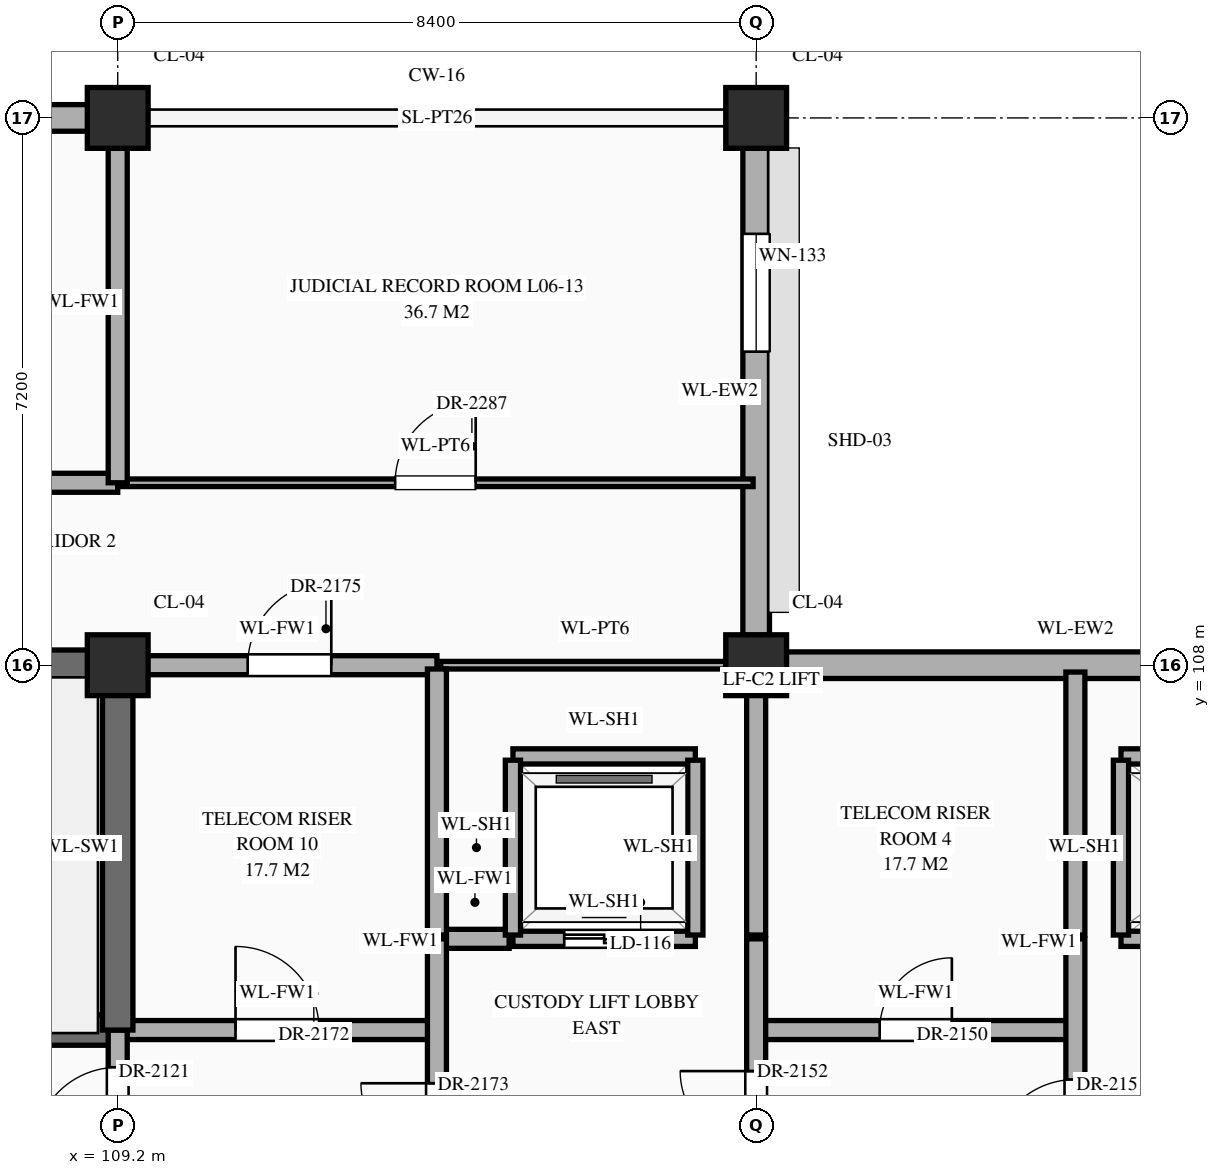
"""IFC4 building model, lengths in metres.
Left out: names, types, materials, properties, quantities, classifications, styles, units other than length and angle.
Written with IfcOpenShell. Run it as: python <this file> out.ifc"""

import sys

from ifc_helpers import new_model, si_unit, direction, frame, frame_2d, origin, origin_2d, place, context, subcontext, project, spatial, rectangle, extrude, element, fill, save


model = new_model("IFC4")
c1 = context("Model", 3, precision=1e-05, world=origin(), true_north=direction((0.0, 1.0)))
c2 = subcontext(c1, "Body", "Model", "MODEL_VIEW")
j1 = project(units=[si_unit("LENGTHUNIT", "METRE"), si_unit("PLANEANGLEUNIT", "RADIAN")], contexts=[c1])
p1 = place(None, origin())
s1 = spatial("IfcSite", under=j1, at=p1, CompositionType="ELEMENT")
p2 = place(p1, origin())
s2 = spatial("IfcBuilding", under=s1, at=p2, CompositionType="ELEMENT")
p3 = place(p2, frame((0.0, 0.0, 26.1)))
s3 = spatial("IfcBuildingStorey", under=s2, at=p3, CompositionType="ELEMENT", Elevation=26.1)
for number, where, z_axis, x_axis in (
    (1, (109.2, 108.0, 0.0), (0.0, 0.0, 1.0), (1.0, 0.0, 0.0)),
    (2, (109.2, 115.2, 0.0), (0.0, 0.0, 1.0), (1.0, 0.0, 0.0)),
    (3, (117.6, 108.0, 0.0), (0.0, 0.0, 1.0), (1.0, 0.0, 0.0)),
    (4, (117.6, 115.2, 0.0), (0.0, 0.0, 1.0), (1.0, 0.0, 0.0)),
):
    element("IfcColumn", number, at=place(p3, frame(where, z_axis=z_axis, x_axis=x_axis)), inside=s3, PredefinedType="COLUMN", context=c2, shape_type="SweptSolid", body=[
        extrude(rectangle(XDim=0.8, YDim=0.8, at=origin_2d()), origin(), (0.0, 0.0, 1.0), 4.5),
    ])
p4 = place(p3, frame((101.195, 115.2, 0.0), z_axis=(0.0, 0.0, 1.0), x_axis=(1.0, 0.0, 0.0)))
e5 = element("IfcWall", 5, at=p4, inside=s3, PredefinedType="STANDARD", context=c2, shape_type="SweptSolid", body=[
    extrude(rectangle(XDim=7.61, YDim=0.35, at=frame_2d((3.805, 0.0))), origin(), (0.0, 0.0, 1.0), 3.59),
])
p5 = place(p3, frame((117.6, 108.395, 0.0), z_axis=(0.0, 0.0, 1.0), x_axis=(0.0, 1.0, 0.0)))
e6 = element("IfcWall", 6, at=p5, inside=s3, PredefinedType="STANDARD", context=c2, shape_type="SweptSolid", body=[
    extrude(rectangle(XDim=6.41, YDim=0.35, at=frame_2d((3.205, 0.0))), origin(), (0.0, 0.0, 1.0), 3.59),
])
p6 = place(p5, frame((3.73, 0.0, 0.85)))
e7 = element("IfcOpeningElement", 7, at=p6, cuts=e6, PredefinedType="OPENING", context=c2, shape_type="SweptSolid", body=[
    extrude(rectangle(XDim=1.55, YDim=2.12, at=frame_2d((0.775, 1.06))), frame((0.0, 0.187, 0.0), z_axis=(0.0, -1.0, 0.0), x_axis=(1.0, 0.0, 0.0)), (0.0, 0.0, 1.0), 0.374),
])
p7 = place(p3, frame((117.995, 108.0, 0.0), z_axis=(0.0, 0.0, 1.0), x_axis=(1.0, 0.0, 0.0)))
e8 = element("IfcWall", 8, at=p7, inside=s3, PredefinedType="STANDARD", context=c2, shape_type="SweptSolid", body=[
    extrude(rectangle(XDim=7.61, YDim=0.35, at=frame_2d((3.805, 0.0))), origin(), (0.0, 0.0, 1.0), 3.59),
])
p8 = place(p3, frame((100.8, 103.2, 0.0), z_axis=(0.0, 0.0, 1.0), x_axis=(1.0, 0.0, 0.0)))
e9 = element("IfcWall", 9, at=p8, inside=s3, PredefinedType="SHEAR", context=c2, shape_type="SweptSolid", body=[
    extrude(rectangle(XDim=8.4, YDim=0.4, at=frame_2d((4.2, 0.0))), origin(), (0.0, 0.0, 1.0), 4.24),
])
p9 = place(p8, frame((0.65, 0.0, 0.0)))
e10 = element("IfcOpeningElement", 10, at=p9, cuts=e9, PredefinedType="OPENING", context=c2, shape_type="SweptSolid", body=[
    extrude(rectangle(XDim=1.1, YDim=2.2, at=frame_2d((0.55, 1.1))), frame((0.0, 0.212, 0.0), z_axis=(0.0, -1.0, 0.0), x_axis=(1.0, 0.0, 0.0)), (0.0, 0.0, 1.0), 0.424),
])
p10 = place(p3, frame((109.2, 103.2, 0.0), z_axis=(0.0, 0.0, 1.0), x_axis=(1.0, 0.0, 0.0)))
e11 = element("IfcWall", 11, at=p10, inside=s3, PredefinedType="STANDARD", context=c2, shape_type="SweptSolid", body=[
    extrude(rectangle(XDim=4.2, YDim=0.25, at=frame_2d((2.1, 0.0))), origin(), (0.0, 0.0, 1.0), 4.24),
])
p11 = place(p10, frame((1.55, 0.0, 0.0)))
e12 = element("IfcOpeningElement", 12, at=p11, cuts=e11, PredefinedType="OPENING", context=c2, shape_type="SweptSolid", body=[
    extrude(rectangle(XDim=1.1, YDim=2.2, at=frame_2d((0.55, 1.1))), frame((0.0, 0.137, 0.0), z_axis=(0.0, -1.0, 0.0), x_axis=(1.0, 0.0, 0.0)), (0.0, 0.0, 1.0), 0.274),
])
p12 = place(p3, frame((117.6, 103.2, 0.0), z_axis=(0.0, 0.0, 1.0), x_axis=(1.0, 0.0, 0.0)))
e13 = element("IfcWall", 13, at=p12, inside=s3, PredefinedType="STANDARD", context=c2, shape_type="SweptSolid", body=[
    extrude(rectangle(XDim=4.2, YDim=0.25, at=frame_2d((2.1, 0.0))), origin(), (0.0, 0.0, 1.0), 4.24),
])
p13 = place(p12, frame((1.625, 0.0, 0.0)))
e14 = element("IfcOpeningElement", 14, at=p13, cuts=e13, PredefinedType="OPENING", context=c2, shape_type="SweptSolid", body=[
    extrude(rectangle(XDim=0.95, YDim=2.15, at=frame_2d((0.475, 1.075))), frame((0.0, 0.137, 0.0), z_axis=(0.0, -1.0, 0.0), x_axis=(1.0, 0.0, 0.0)), (0.0, 0.0, 1.0), 0.274),
])
p14 = place(p3, frame((113.45, 104.4, 0.0), z_axis=(0.0, 0.0, 1.0), x_axis=(1.0, 0.0, 0.0)))
e15 = element("IfcWall", 15, at=p14, inside=s3, PredefinedType="STANDARD", context=c2, shape_type="SweptSolid", body=[
    extrude(rectangle(XDim=0.9, YDim=0.25, at=frame_2d((0.45, 0.0))), origin(), (0.0, 0.0, 1.0), 4.24),
])
p15 = place(p3, frame((114.4, 104.4, 0.0), z_axis=(0.0, 0.0, 1.0), x_axis=(1.0, 0.0, 0.0)))
e16 = element("IfcWall", 16, at=p15, inside=s3, PredefinedType="STANDARD", context=c2, shape_type="SweptSolid", body=[
    extrude(rectangle(XDim=2.4, YDim=0.2, at=frame_2d((1.2, 0.0))), origin(), (0.0, 0.0, 1.0), 4.24),
])
p16 = place(p15, frame((0.675, 0.0, 0.0)))
e17 = element("IfcOpeningElement", 17, at=p16, cuts=e16, PredefinedType="OPENING", context=c2, shape_type="SweptSolid", body=[
    extrude(rectangle(XDim=1.05, YDim=2.15, at=frame_2d((0.525, 1.075))), frame((0.0, 0.112, 0.0), z_axis=(0.0, -1.0, 0.0), x_axis=(1.0, 0.0, 0.0)), (0.0, 0.0, 1.0), 0.224),
])
p17 = place(p3, frame((122.4, 104.4, 0.0), z_axis=(0.0, 0.0, 1.0), x_axis=(1.0, 0.0, 0.0)))
e18 = element("IfcWall", 18, at=p17, inside=s3, PredefinedType="STANDARD", context=c2, shape_type="SweptSolid", body=[
    extrude(rectangle(XDim=3.0, YDim=0.2, at=frame_2d((1.5, 0.0))), origin(), (0.0, 0.0, 1.0), 4.24),
])
p18 = place(p17, frame((0.9, 0.0, 0.0)))
e19 = element("IfcOpeningElement", 19, at=p18, cuts=e18, PredefinedType="OPENING", context=c2, shape_type="SweptSolid", body=[
    extrude(rectangle(XDim=1.2, YDim=2.15, at=frame_2d((0.6, 1.075))), frame((0.0, 0.112, 0.0), z_axis=(0.0, -1.0, 0.0), x_axis=(1.0, 0.0, 0.0)), (0.0, 0.0, 1.0), 0.224),
])
p19 = place(p3, frame((114.4, 106.8, 0.0), z_axis=(0.0, 0.0, 1.0), x_axis=(1.0, 0.0, 0.0)))
e20 = element("IfcWall", 20, at=p19, inside=s3, PredefinedType="STANDARD", context=c2, shape_type="SweptSolid", body=[
    extrude(rectangle(XDim=2.4, YDim=0.2, at=frame_2d((1.2, 0.0))), origin(), (0.0, 0.0, 1.0), 4.24),
])
p20 = place(p3, frame((122.4, 106.8, 0.0), z_axis=(0.0, 0.0, 1.0), x_axis=(1.0, 0.0, 0.0)))
e21 = element("IfcWall", 21, at=p20, inside=s3, PredefinedType="STANDARD", context=c2, shape_type="SweptSolid", body=[
    extrude(rectangle(XDim=3.0, YDim=0.2, at=frame_2d((1.5, 0.0))), origin(), (0.0, 0.0, 1.0), 4.24),
])
p21 = place(p3, frame((100.8, 108.0, 0.0), z_axis=(0.0, 0.0, 1.0), x_axis=(1.0, 0.0, 0.0)))
e22 = element("IfcWall", 22, at=p21, inside=s3, PredefinedType="SHEAR", context=c2, shape_type="SweptSolid", body=[
    extrude(rectangle(XDim=8.4, YDim=0.4, at=frame_2d((4.2, 0.0))), origin(), (0.0, 0.0, 1.0), 4.24),
])
p22 = place(p3, frame((109.2, 108.0, 0.0), z_axis=(0.0, 0.0, 1.0), x_axis=(1.0, 0.0, 0.0)))
e23 = element("IfcWall", 23, at=p22, inside=s3, PredefinedType="STANDARD", context=c2, shape_type="SweptSolid", body=[
    extrude(rectangle(XDim=4.2, YDim=0.25, at=frame_2d((2.1, 0.0))), origin(), (0.0, 0.0, 1.0), 3.39),
])
p23 = place(p22, frame((1.71, 0.0, 0.0)))
e24 = element("IfcOpeningElement", 24, at=p23, cuts=e23, PredefinedType="OPENING", context=c2, shape_type="SweptSolid", body=[
    extrude(rectangle(XDim=1.1, YDim=2.2, at=frame_2d((0.55, 1.1))), frame((0.0, 0.137, 0.0), z_axis=(0.0, -1.0, 0.0), x_axis=(1.0, 0.0, 0.0)), (0.0, 0.0, 1.0), 0.274),
])
p24 = place(p3, frame((113.45, 108.0, 0.0), z_axis=(0.0, 0.0, 1.0), x_axis=(1.0, 0.0, 0.0)))
e25 = element("IfcWall", 25, at=p24, inside=s3, PredefinedType="STANDARD", context=c2, shape_type="SweptSolid", body=[
    extrude(rectangle(XDim=4.06, YDim=0.1, at=frame_2d((2.03, 0.0))), origin(), (0.0, 0.0, 1.0), 3.39),
])
p25 = place(p3, frame((100.8, 110.4, 0.0), z_axis=(0.0, 0.0, 1.0), x_axis=(1.0, 0.0, 0.0)))
e26 = element("IfcWall", 26, at=p25, inside=s3, PredefinedType="STANDARD", context=c2, shape_type="SweptSolid", body=[
    extrude(rectangle(XDim=8.4, YDim=0.25, at=frame_2d((4.2, 0.0))), origin(), (0.0, 0.0, 1.0), 4.24),
])
p26 = place(p25, frame((3.65, 0.0, 0.0)))
e27 = element("IfcOpeningElement", 27, at=p26, cuts=e26, PredefinedType="OPENING", context=c2, shape_type="SweptSolid", body=[
    extrude(rectangle(XDim=1.1, YDim=2.2, at=frame_2d((0.55, 1.1))), frame((0.0, 0.137, 0.0), z_axis=(0.0, -1.0, 0.0), x_axis=(1.0, 0.0, 0.0)), (0.0, 0.0, 1.0), 0.274),
])
p27 = place(p3, frame((109.2, 110.4, 0.0), z_axis=(0.0, 0.0, 1.0), x_axis=(1.0, 0.0, 0.0)))
e28 = element("IfcWall", 28, at=p27, inside=s3, PredefinedType="STANDARD", context=c2, shape_type="SweptSolid", body=[
    extrude(rectangle(XDim=8.36, YDim=0.1, at=frame_2d((4.18, 0.0))), origin(), (0.0, 0.0, 1.0), 4.24),
])
p28 = place(p27, frame((3.65, 0.0, 0.0)))
e29 = element("IfcOpeningElement", 29, at=p28, cuts=e28, PredefinedType="OPENING", context=c2, shape_type="SweptSolid", body=[
    extrude(rectangle(XDim=1.06, YDim=2.4, at=frame_2d((0.53, 1.2))), frame((0.0, 0.062, 0.0), z_axis=(0.0, -1.0, 0.0), x_axis=(1.0, 0.0, 0.0)), (0.0, 0.0, 1.0), 0.124),
])
p29 = place(p3, frame((109.2, 100.8, 0.0), z_axis=(0.0, 0.0, 1.0), x_axis=(0.0, 1.0, 0.0)))
e30 = element("IfcWall", 30, at=p29, inside=s3, PredefinedType="STANDARD", context=c2, shape_type="SweptSolid", body=[
    extrude(rectangle(XDim=2.4, YDim=0.25, at=frame_2d((1.2, 0.0))), origin(), (0.0, 0.0, 1.0), 3.49),
])
p30 = place(p29, frame((0.81, 0.0, 0.0)))
e31 = element("IfcOpeningElement", 31, at=p30, cuts=e30, PredefinedType="OPENING", context=c2, shape_type="SweptSolid", body=[
    extrude(rectangle(XDim=1.1, YDim=2.2, at=frame_2d((0.55, 1.1))), frame((0.0, 0.137, 0.0), z_axis=(0.0, -1.0, 0.0), x_axis=(1.0, 0.0, 0.0)), (0.0, 0.0, 1.0), 0.274),
])
p31 = place(p3, frame((109.2, 103.2, 0.0), z_axis=(0.0, 0.0, 1.0), x_axis=(0.0, 1.0, 0.0)))
e32 = element("IfcWall", 32, at=p31, inside=s3, PredefinedType="SHEAR", context=c2, shape_type="SweptSolid", body=[
    extrude(rectangle(XDim=4.8, YDim=0.4, at=frame_2d((2.4, 0.0))), origin(), (0.0, 0.0, 1.0), 4.24),
])
p32 = place(p3, frame((109.2, 110.4, 0.0), z_axis=(0.0, 0.0, 1.0), x_axis=(0.0, 1.0, 0.0)))
e33 = element("IfcWall", 33, at=p32, inside=s3, PredefinedType="STANDARD", context=c2, shape_type="SweptSolid", body=[
    extrude(rectangle(XDim=4.76, YDim=0.25, at=frame_2d((2.38, 0.0))), origin(), (0.0, 0.0, 1.0), 3.49),
])
p33 = place(p3, frame((113.4, 100.8, 0.0), z_axis=(0.0, 0.0, 1.0), x_axis=(0.0, 1.0, 0.0)))
e34 = element("IfcWall", 34, at=p33, inside=s3, PredefinedType="STANDARD", context=c2, shape_type="SweptSolid", body=[
    extrude(rectangle(XDim=3.6, YDim=0.25, at=frame_2d((1.8, 0.0))), origin(), (0.0, 0.0, 1.0), 3.84),
])
p34 = place(p33, frame((0.7, 0.0, 0.0)))
e35 = element("IfcOpeningElement", 35, at=p34, cuts=e34, PredefinedType="OPENING", context=c2, shape_type="SweptSolid", body=[
    extrude(rectangle(XDim=1.0, YDim=2.2, at=frame_2d((0.5, 1.1))), frame((0.0, 0.137, 0.0), z_axis=(0.0, -1.0, 0.0), x_axis=(1.0, 0.0, 0.0)), (0.0, 0.0, 1.0), 0.274),
])
p35 = place(p3, frame((113.4, 104.45, 0.0), z_axis=(0.0, 0.0, 1.0), x_axis=(0.0, 1.0, 0.0)))
e36 = element("IfcWall", 36, at=p35, inside=s3, PredefinedType="STANDARD", context=c2, shape_type="SweptSolid", body=[
    extrude(rectangle(XDim=3.5, YDim=0.25, at=frame_2d((1.75, 0.0))), origin(), (0.0, 0.0, 1.0), 3.84),
])
for number, where, z_axis, x_axis in (
    (37, (114.4, 104.45, 0.0), (0.0, 0.0, 1.0), (0.0, 1.0, 0.0)),
    (38, (116.8, 104.45, 0.0), (0.0, 0.0, 1.0), (0.0, 1.0, 0.0)),
):
    element("IfcWall", number, at=place(p3, frame(where, z_axis=z_axis, x_axis=x_axis)), inside=s3, PredefinedType="STANDARD", context=c2, shape_type="SweptSolid", body=[
        extrude(rectangle(XDim=2.3, YDim=0.2, at=frame_2d((1.15, 0.0))), origin(), (0.0, 0.0, 1.0), 4.24),
    ])
p36 = place(p3, frame((117.6, 91.2, 0.0), z_axis=(0.0, 0.0, 1.0), x_axis=(0.0, 1.0, 0.0)))
e39 = element("IfcWall", 39, at=p36, inside=s3, PredefinedType="STANDARD", context=c2, shape_type="SweptSolid", body=[
    extrude(rectangle(XDim=13.2, YDim=0.25, at=frame_2d((6.6, 0.0))), origin(), (0.0, 0.0, 1.0), 3.49),
])
p37 = place(p36, frame((0.49, 0.0, 0.0)))
e40 = element("IfcOpeningElement", 40, at=p37, cuts=e39, PredefinedType="OPENING", context=c2, shape_type="SweptSolid", body=[
    extrude(rectangle(XDim=1.1, YDim=2.2, at=frame_2d((0.55, 1.1))), frame((0.0, 0.137, 0.0), z_axis=(0.0, -1.0, 0.0), x_axis=(1.0, 0.0, 0.0)), (0.0, 0.0, 1.0), 0.274),
])
p38 = place(p36, frame((10.46, 0.0, 0.0)))
e41 = element("IfcOpeningElement", 41, at=p38, cuts=e39, PredefinedType="OPENING", context=c2, shape_type="SweptSolid", body=[
    extrude(rectangle(XDim=1.0, YDim=2.2, at=frame_2d((0.5, 1.1))), frame((0.0, 0.137, 0.0), z_axis=(0.0, -1.0, 0.0), x_axis=(1.0, 0.0, 0.0)), (0.0, 0.0, 1.0), 0.274),
])
p39 = place(p36, frame((3.26, 0.0, 0.0)))
e42 = element("IfcOpeningElement", 42, at=p39, cuts=e39, PredefinedType="OPENING", context=c2, shape_type="SweptSolid", body=[
    extrude(rectangle(XDim=1.0, YDim=2.2, at=frame_2d((0.5, 1.1))), frame((0.0, 0.137, 0.0), z_axis=(0.0, -1.0, 0.0), x_axis=(1.0, 0.0, 0.0)), (0.0, 0.0, 1.0), 0.274),
])
p40 = place(p3, frame((117.6, 104.45, 0.0), z_axis=(0.0, 0.0, 1.0), x_axis=(0.0, 1.0, 0.0)))
e43 = element("IfcWall", 43, at=p40, inside=s3, PredefinedType="STANDARD", context=c2, shape_type="SweptSolid", body=[
    extrude(rectangle(XDim=3.46, YDim=0.25, at=frame_2d((1.73, 0.0))), origin(), (0.0, 0.0, 1.0), 3.49),
])
p41 = place(p3, frame((121.8, 100.8, 0.0), z_axis=(0.0, 0.0, 1.0), x_axis=(0.0, 1.0, 0.0)))
e44 = element("IfcWall", 44, at=p41, inside=s3, PredefinedType="STANDARD", context=c2, shape_type="SweptSolid", body=[
    extrude(rectangle(XDim=3.6, YDim=0.25, at=frame_2d((1.8, 0.0))), origin(), (0.0, 0.0, 1.0), 3.89),
])
p42 = place(p41, frame((0.65, 0.0, 0.0)))
e45 = element("IfcOpeningElement", 45, at=p42, cuts=e44, PredefinedType="OPENING", context=c2, shape_type="SweptSolid", body=[
    extrude(rectangle(XDim=1.1, YDim=2.2, at=frame_2d((0.55, 1.1))), frame((0.0, 0.137, 0.0), z_axis=(0.0, -1.0, 0.0), x_axis=(1.0, 0.0, 0.0)), (0.0, 0.0, 1.0), 0.274),
])
p43 = place(p3, frame((121.8, 104.45, 0.0), z_axis=(0.0, 0.0, 1.0), x_axis=(0.0, 1.0, 0.0)))
e46 = element("IfcWall", 46, at=p43, inside=s3, PredefinedType="STANDARD", context=c2, shape_type="SweptSolid", body=[
    extrude(rectangle(XDim=3.46, YDim=0.25, at=frame_2d((1.73, 0.0))), origin(), (0.0, 0.0, 1.0), 3.89),
])
p44 = place(p3, frame((122.4, 104.45, 0.0), z_axis=(0.0, 0.0, 1.0), x_axis=(0.0, 1.0, 0.0)))
e47 = element("IfcWall", 47, at=p44, inside=s3, PredefinedType="STANDARD", context=c2, shape_type="SweptSolid", body=[
    extrude(rectangle(XDim=2.3, YDim=0.2, at=frame_2d((1.15, 0.0))), origin(), (0.0, 0.0, 1.0), 4.24),
])
p45 = place(p6, origin())
e48 = element("IfcWindow", 48, at=p45, inside=s3, PartitioningType="SINGLE_PANEL", PredefinedType="WINDOW", context=c2, shape_type="SweptSolid", body=[
    extrude(rectangle(XDim=1.55, YDim=2.12, at=frame_2d((0.775, 1.06))), frame((0.0, 0.03, 0.0), z_axis=(0.0, -1.0, 0.0), x_axis=(1.0, 0.0, 0.0)), (0.0, 0.0, 1.0), 0.06),
])
fill(e7, e48)
p46 = place(p16, origin())
e49 = element("IfcDoor", 49, at=p46, inside=s3, OperationType="DOUBLE_DOOR_SLIDING", PredefinedType="DOOR", context=c2, shape_type="SweptSolid", body=[
    extrude(rectangle(XDim=1.05, YDim=2.15, at=frame_2d((0.525, 1.075))), frame((0.0, 0.025, 0.0), z_axis=(0.0, -1.0, 0.0), x_axis=(1.0, 0.0, 0.0)), (0.0, 0.0, 1.0), 0.05),
])
fill(e17, e49)
p47 = place(p30, origin())
e50 = element("IfcDoor", 50, at=p47, inside=s3, OperationType="SINGLE_SWING_LEFT", PredefinedType="DOOR", context=c2, shape_type="SweptSolid", body=[
    extrude(rectangle(XDim=1.1, YDim=2.2, at=frame_2d((0.55, 1.1))), frame((0.0, 0.025, 0.0), z_axis=(0.0, -1.0, 0.0), x_axis=(1.0, 0.0, 0.0)), (0.0, 0.0, 1.0), 0.05),
])
fill(e31, e50)
p48 = place(p13, origin())
e51 = element("IfcDoor", 51, at=p48, inside=s3, OperationType="SINGLE_SWING_RIGHT", PredefinedType="DOOR", context=c2, shape_type="SweptSolid", body=[
    extrude(rectangle(XDim=0.95, YDim=2.15, at=frame_2d((0.475, 1.075))), frame((0.0, 0.025, 0.0), z_axis=(0.0, -1.0, 0.0), x_axis=(1.0, 0.0, 0.0)), (0.0, 0.0, 1.0), 0.05),
])
fill(e14, e51)
p49 = place(p42, origin())
e52 = element("IfcDoor", 52, at=p49, inside=s3, OperationType="SINGLE_SWING_LEFT", PredefinedType="DOOR", context=c2, shape_type="SweptSolid", body=[
    extrude(rectangle(XDim=1.1, YDim=2.2, at=frame_2d((0.55, 1.1))), frame((0.0, 0.025, 0.0), z_axis=(0.0, -1.0, 0.0), x_axis=(1.0, 0.0, 0.0)), (0.0, 0.0, 1.0), 0.05),
])
fill(e45, e52)
p50 = place(p38, origin())
e53 = element("IfcDoor", 53, at=p50, inside=s3, OperationType="SINGLE_SWING_RIGHT", PredefinedType="DOOR", context=c2, shape_type="SweptSolid", body=[
    extrude(rectangle(XDim=1.0, YDim=2.2, at=frame_2d((0.5, 1.1))), frame((0.0, 0.025, 0.0), z_axis=(0.0, -1.0, 0.0), x_axis=(1.0, 0.0, 0.0)), (0.0, 0.0, 1.0), 0.05),
])
fill(e41, e53)
p51 = place(p11, origin())
e54 = element("IfcDoor", 54, at=p51, inside=s3, OperationType="SINGLE_SWING_LEFT", PredefinedType="DOOR", context=c2, shape_type="SweptSolid", body=[
    extrude(rectangle(XDim=1.1, YDim=2.2, at=frame_2d((0.55, 1.1))), frame((0.0, 0.025, 0.0), z_axis=(0.0, -1.0, 0.0), x_axis=(1.0, 0.0, 0.0)), (0.0, 0.0, 1.0), 0.05),
])
fill(e12, e54)
p52 = place(p34, origin())
e55 = element("IfcDoor", 55, at=p52, inside=s3, OperationType="SINGLE_SWING_RIGHT", PredefinedType="DOOR", context=c2, shape_type="SweptSolid", body=[
    extrude(rectangle(XDim=1.0, YDim=2.2, at=frame_2d((0.5, 1.1))), frame((0.0, 0.025, 0.0), z_axis=(0.0, -1.0, 0.0), x_axis=(1.0, 0.0, 0.0)), (0.0, 0.0, 1.0), 0.05),
])
fill(e35, e55)
p53 = place(p23, origin())
e56 = element("IfcDoor", 56, at=p53, inside=s3, OperationType="SINGLE_SWING_RIGHT", PredefinedType="DOOR", context=c2, shape_type="SweptSolid", body=[
    extrude(rectangle(XDim=1.1, YDim=2.2, at=frame_2d((0.55, 1.1))), frame((0.0, 0.025, 0.0), z_axis=(0.0, -1.0, 0.0), x_axis=(1.0, 0.0, 0.0)), (0.0, 0.0, 1.0), 0.05),
])
fill(e24, e56)
p54 = place(p28, origin())
e57 = element("IfcDoor", 57, at=p54, inside=s3, OperationType="SINGLE_SWING_RIGHT", PredefinedType="DOOR", context=c2, shape_type="SweptSolid", body=[
    extrude(rectangle(XDim=1.06, YDim=2.4, at=frame_2d((0.53, 1.2))), frame((0.0, 0.025, 0.0), z_axis=(0.0, -1.0, 0.0), x_axis=(1.0, 0.0, 0.0)), (0.0, 0.0, 1.0), 0.05),
])
fill(e29, e57)
save(model, sys.argv[1])
